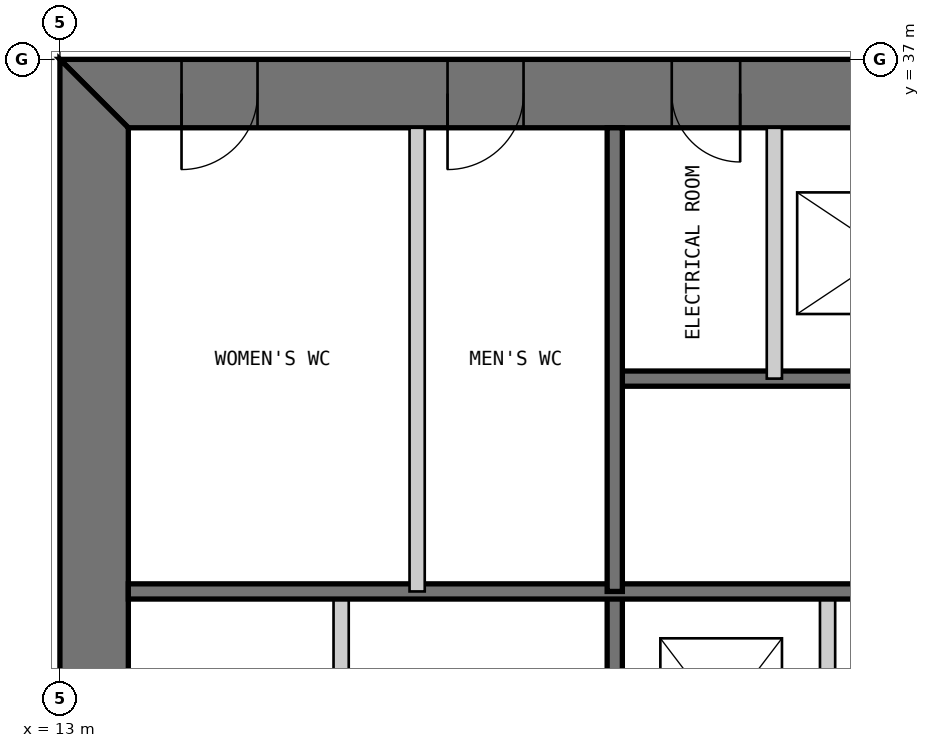
"""IFC4 building model, lengths in metres.
Left out: names, types, materials, properties, quantities, classifications, styles, units other than length and angle.
Written with IfcOpenShell. Run it as: python <this file> out.ifc"""

import sys

from ifc_helpers import new_model, si_unit, direction, frame, frame_2d, origin, place, context, subcontext, project, spatial, polyline, rectangle, outline, extrude, element, fill, save


model = new_model("IFC4")
c1 = context("Model", 3, precision=1e-05, world=origin(), true_north=direction((0.0, 1.0)))
c2 = subcontext(c1, "Body", "Model", "MODEL_VIEW")
j1 = project(units=[si_unit("LENGTHUNIT", "METRE"), si_unit("PLANEANGLEUNIT", "RADIAN")], contexts=[c1])
p1 = place(None, origin())
s1 = spatial("IfcSite", under=j1, at=p1, CompositionType="ELEMENT")
p2 = place(p1, origin())
s2 = spatial("IfcBuilding", under=s1, at=p2, CompositionType="ELEMENT")
p3 = place(p2, frame((0.0, 0.0, 106.4)))
s3 = spatial("IfcBuildingStorey", under=s2, at=p3, CompositionType="ELEMENT", Elevation=106.4)
p4 = place(p3, frame((37.0, 36.55, 0.0), z_axis=(0.0, 0.0, 1.0), x_axis=(-1.0, 0.0, 0.0)))
e1 = element("IfcWall", 1, at=p4, inside=s3, PredefinedType="SHEAR", context=c2, shape_type="SweptSolid", body=[
    extrude(outline(polyline([(0.0, -0.45), (24.0, -0.45), (23.1, 0.45), (0.9, 0.45), (0.0, -0.45)])), origin(), (0.0, 0.0, 1.0), 4.0),
])
p5 = place(p4, frame((4.9, 0.0, 0.0)))
e2 = element("IfcOpeningElement", 2, at=p5, cuts=e1, PredefinedType="OPENING", context=c2, shape_type="SweptSolid", body=[
    extrude(rectangle(XDim=1.0, YDim=2.2, at=frame_2d((0.5, 1.1))), frame((0.0, 0.46, 0.0), z_axis=(0.0, -1.0, 0.0), x_axis=(1.0, 0.0, 0.0)), (0.0, 0.0, 1.0), 0.92),
])
p6 = place(p4, frame((8.9, 0.0, 0.0)))
e3 = element("IfcOpeningElement", 3, at=p6, cuts=e1, PredefinedType="OPENING", context=c2, shape_type="SweptSolid", body=[
    extrude(rectangle(XDim=1.1, YDim=2.2, at=frame_2d((0.55, 1.1))), frame((0.0, 0.46, 0.0), z_axis=(0.0, -1.0, 0.0), x_axis=(1.0, 0.0, 0.0)), (0.0, 0.0, 1.0), 0.92),
])
p7 = place(p4, frame((15.05, 0.0, 0.0)))
e4 = element("IfcOpeningElement", 4, at=p7, cuts=e1, PredefinedType="OPENING", context=c2, shape_type="SweptSolid", body=[
    extrude(rectangle(XDim=0.9, YDim=2.2, at=frame_2d((0.45, 1.1))), frame((0.0, 0.46, 0.0), z_axis=(0.0, -1.0, 0.0), x_axis=(1.0, 0.0, 0.0)), (0.0, 0.0, 1.0), 0.92),
])
p8 = place(p4, frame((17.9, 0.0, 0.0)))
e5 = element("IfcOpeningElement", 5, at=p8, cuts=e1, PredefinedType="OPENING", context=c2, shape_type="SweptSolid", body=[
    extrude(rectangle(XDim=1.0, YDim=2.2, at=frame_2d((0.5, 1.1))), frame((0.0, 0.46, 0.0), z_axis=(0.0, -1.0, 0.0), x_axis=(1.0, 0.0, 0.0)), (0.0, 0.0, 1.0), 0.92),
])
p9 = place(p4, frame((21.4, 0.0, 0.0)))
e6 = element("IfcOpeningElement", 6, at=p9, cuts=e1, PredefinedType="OPENING", context=c2, shape_type="SweptSolid", body=[
    extrude(rectangle(XDim=1.0, YDim=2.2, at=frame_2d((0.5, 1.1))), frame((0.0, 0.46, 0.0), z_axis=(0.0, -1.0, 0.0), x_axis=(1.0, 0.0, 0.0)), (0.0, 0.0, 1.0), 0.92),
])
p10 = place(p3, frame((13.45, 36.1, 0.0), z_axis=(0.0, 0.0, 1.0), x_axis=(0.0, -1.0, 0.0)))
e7 = element("IfcWall", 7, at=p10, inside=s3, PredefinedType="SHEAR", context=c2, shape_type="SweptSolid", body=[
    extrude(outline(polyline([(-0.9, -0.45), (23.1, -0.45), (22.2, 0.45), (0.0, 0.45), (-0.9, -0.45)])), origin(), (0.0, 0.0, 1.0), 4.0),
])
p11 = place(p10, frame((20.2, 0.0, 0.0)))
e8 = element("IfcOpeningElement", 8, at=p11, cuts=e7, PredefinedType="OPENING", context=c2, shape_type="SweptSolid", body=[
    extrude(rectangle(XDim=1.0, YDim=2.2, at=frame_2d((0.5, 1.1))), frame((0.0, 0.46, 0.0), z_axis=(0.0, -1.0, 0.0), x_axis=(1.0, 0.0, 0.0)), (0.0, 0.0, 1.0), 0.92),
])
p12 = place(p10, frame((17.25, 0.0, 0.0)))
e9 = element("IfcOpeningElement", 9, at=p12, cuts=e7, PredefinedType="OPENING", context=c2, shape_type="SweptSolid", body=[
    extrude(rectangle(XDim=0.9, YDim=2.2, at=frame_2d((0.45, 1.1))), frame((0.0, 0.46, 0.0), z_axis=(0.0, -1.0, 0.0), x_axis=(1.0, 0.0, 0.0)), (0.0, 0.0, 1.0), 0.92),
])
p13 = place(p3, frame((16.7, 13.9, 0.0), z_axis=(0.0, 0.0, 1.0), x_axis=(0.0, 1.0, 0.0)))
e10 = element("IfcWall", 10, at=p13, inside=s3, PredefinedType="PARTITIONING", context=c2, shape_type="SweptSolid", body=[
    extrude(rectangle(XDim=16.1, YDim=0.2, at=frame_2d((8.05, 0.0))), origin(), (0.0, 0.0, 1.0), 3.8),
])
p14 = place(p13, frame((7.4, 0.0, 0.0)))
e11 = element("IfcOpeningElement", 11, at=p14, cuts=e10, PredefinedType="OPENING", context=c2, shape_type="SweptSolid", body=[
    extrude(rectangle(XDim=0.9, YDim=2.2, at=frame_2d((0.45, 1.1))), frame((0.0, 0.11, 0.0), z_axis=(0.0, -1.0, 0.0), x_axis=(1.0, 0.0, 0.0)), (0.0, 0.0, 1.0), 0.22),
])
p15 = place(p13, frame((12.4, 0.0, 0.0)))
e12 = element("IfcOpeningElement", 12, at=p15, cuts=e10, PredefinedType="OPENING", context=c2, shape_type="SweptSolid", body=[
    extrude(rectangle(XDim=0.9, YDim=2.2, at=frame_2d((0.45, 1.1))), frame((0.0, 0.11, 0.0), z_axis=(0.0, -1.0, 0.0), x_axis=(1.0, 0.0, 0.0)), (0.0, 0.0, 1.0), 0.22),
])
p16 = place(p3, frame((20.3, 13.9, 0.0), z_axis=(0.0, 0.0, 1.0), x_axis=(0.0, 1.0, 0.0)))
e13 = element("IfcWall", 13, at=p16, inside=s3, PredefinedType="SOLIDWALL", context=c2, shape_type="SweptSolid", body=[
    extrude(rectangle(XDim=16.1, YDim=0.2, at=frame_2d((8.05, 0.0))), origin(), (0.0, 0.0, 1.0), 3.8),
])
p17 = place(p16, frame((7.217, 0.0, 0.0)))
e14 = element("IfcOpeningElement", 14, at=p17, cuts=e13, PredefinedType="OPENING", context=c2, shape_type="SweptSolid", body=[
    extrude(rectangle(XDim=1.1, YDim=2.2, at=frame_2d((0.55, 1.1))), frame((0.0, 0.11, 0.0), z_axis=(0.0, -1.0, 0.0), x_axis=(1.0, 0.0, 0.0)), (0.0, 0.0, 1.0), 0.22),
])
p18 = place(p16, frame((10.55, 0.0, 0.0)))
e15 = element("IfcOpeningElement", 15, at=p18, cuts=e13, PredefinedType="OPENING", context=c2, shape_type="SweptSolid", body=[
    extrude(rectangle(XDim=1.1, YDim=2.2, at=frame_2d((0.55, 1.1))), frame((0.0, 0.11, 0.0), z_axis=(0.0, -1.0, 0.0), x_axis=(1.0, 0.0, 0.0)), (0.0, 0.0, 1.0), 0.22),
])
p19 = place(p16, frame((13.883, 0.0, 0.0)))
e16 = element("IfcOpeningElement", 16, at=p19, cuts=e13, PredefinedType="OPENING", context=c2, shape_type="SweptSolid", body=[
    extrude(rectangle(XDim=1.1, YDim=2.2, at=frame_2d((0.55, 1.1))), frame((0.0, 0.11, 0.0), z_axis=(0.0, -1.0, 0.0), x_axis=(1.0, 0.0, 0.0)), (0.0, 0.0, 1.0), 0.22),
])
p20 = place(p3, frame((23.1, 20.0, 0.0), z_axis=(0.0, 0.0, 1.0), x_axis=(0.0, 1.0, 0.0)))
e17 = element("IfcWall", 17, at=p20, inside=s3, PredefinedType="PARTITIONING", context=c2, shape_type="SweptSolid", body=[
    extrude(rectangle(XDim=10.0, YDim=0.2, at=frame_2d((5.0, 0.0))), origin(), (0.0, 0.0, 1.0), 3.8),
])
p21 = place(p3, frame((29.7, 32.8, 0.0), z_axis=(0.0, 0.0, 1.0), x_axis=(-1.0, 0.0, 0.0)))
e18 = element("IfcWall", 18, at=p21, inside=s3, PredefinedType="SOLIDWALL", context=c2, shape_type="SweptSolid", body=[
    extrude(rectangle(XDim=9.4, YDim=0.2, at=frame_2d((4.7, 0.0))), origin(), (0.0, 0.0, 1.0), 3.8),
])
p22 = place(p21, frame((0.25, 0.0, 0.0)))
e19 = element("IfcOpeningElement", 19, at=p22, cuts=e18, PredefinedType="OPENING", context=c2, shape_type="SweptSolid", body=[
    extrude(rectangle(XDim=1.0, YDim=2.2, at=frame_2d((0.5, 1.1))), frame((0.0, 0.11, 0.0), z_axis=(0.0, -1.0, 0.0), x_axis=(1.0, 0.0, 0.0)), (0.0, 0.0, 1.0), 0.22),
])
p23 = place(p3, frame((29.7, 30.0, 0.0), z_axis=(0.0, 0.0, 1.0), x_axis=(-1.0, 0.0, 0.0)))
e20 = element("IfcWall", 20, at=p23, inside=s3, PredefinedType="SOLIDWALL", context=c2, shape_type="SweptSolid", body=[
    extrude(rectangle(XDim=15.8, YDim=0.2, at=frame_2d((7.9, 0.0))), origin(), (0.0, 0.0, 1.0), 3.8),
])
p24 = place(p3, frame((22.4, 36.1, 0.0), z_axis=(0.0, 0.0, 1.0), x_axis=(0.0, -1.0, 0.0)))
e21 = element("IfcWall", 21, at=p24, inside=s3, PredefinedType="PARTITIONING", context=c2, shape_type="SweptSolid", body=[
    extrude(rectangle(XDim=3.3, YDim=0.2, at=frame_2d((1.65, 0.0))), origin(), (0.0, 0.0, 1.0), 3.8),
])
p25 = place(p3, frame((20.3, 36.1, 0.0), z_axis=(0.0, 0.0, 1.0), x_axis=(0.0, -1.0, 0.0)))
e22 = element("IfcWall", 22, at=p25, inside=s3, PredefinedType="SOLIDWALL", context=c2, shape_type="SweptSolid", body=[
    extrude(rectangle(XDim=6.1, YDim=0.2, at=frame_2d((3.05, 0.0))), origin(), (0.0, 0.0, 1.0), 3.8),
])
p26 = place(p3, frame((17.7, 36.1, 0.0), z_axis=(0.0, 0.0, 1.0), x_axis=(0.0, -1.0, 0.0)))
e23 = element("IfcWall", 23, at=p26, inside=s3, PredefinedType="PARTITIONING", context=c2, shape_type="SweptSolid", body=[
    extrude(rectangle(XDim=6.1, YDim=0.2, at=frame_2d((3.05, 0.0))), origin(), (0.0, 0.0, 1.0), 3.8),
])
p27 = place(p7, origin())
e24 = element("IfcDoor", 24, at=p27, inside=s3, OperationType="SINGLE_SWING_LEFT", PredefinedType="DOOR", context=c2, shape_type="SweptSolid", body=[
    extrude(rectangle(XDim=0.9, YDim=2.2, at=frame_2d((0.45, 1.1))), frame((0.0, 0.025, 0.0), z_axis=(0.0, -1.0, 0.0), x_axis=(1.0, 0.0, 0.0)), (0.0, 0.0, 1.0), 0.05),
    extrude(outline(polyline([(0.0, 0.0), (0.04, 0.0), (0.04, 2.16), (0.86, 2.16), (0.86, 0.0), (0.9, 0.0), (0.9, 2.2), (0.0, 2.2), (0.0, 0.0)])), frame((0.0, 0.3, 0.0), z_axis=(0.0, -1.0, 0.0), x_axis=(1.0, 0.0, 0.0)), (0.0, 0.0, 1.0), 0.6),
])
fill(e4, e24)
p28 = place(p8, origin())
e25 = element("IfcDoor", 25, at=p28, inside=s3, OperationType="SINGLE_SWING_RIGHT", PredefinedType="DOOR", context=c2, shape_type="SweptSolid", body=[
    extrude(rectangle(XDim=1.0, YDim=2.2, at=frame_2d((0.5, 1.1))), frame((0.0, 0.025, 0.0), z_axis=(0.0, -1.0, 0.0), x_axis=(1.0, 0.0, 0.0)), (0.0, 0.0, 1.0), 0.05),
    extrude(outline(polyline([(0.0, 0.0), (0.04, 0.0), (0.04, 2.16), (0.96, 2.16), (0.96, 0.0), (1.0, 0.0), (1.0, 2.2), (0.0, 2.2), (0.0, 0.0)])), frame((0.0, 0.3, 0.0), z_axis=(0.0, -1.0, 0.0), x_axis=(1.0, 0.0, 0.0)), (0.0, 0.0, 1.0), 0.6),
])
fill(e5, e25)
p29 = place(p9, origin())
e26 = element("IfcDoor", 26, at=p29, inside=s3, OperationType="SINGLE_SWING_RIGHT", PredefinedType="DOOR", context=c2, shape_type="SweptSolid", body=[
    extrude(rectangle(XDim=1.0, YDim=2.2, at=frame_2d((0.5, 1.1))), frame((0.0, 0.025, 0.0), z_axis=(0.0, -1.0, 0.0), x_axis=(1.0, 0.0, 0.0)), (0.0, 0.0, 1.0), 0.05),
    extrude(outline(polyline([(0.0, 0.0), (0.04, 0.0), (0.04, 2.16), (0.96, 2.16), (0.96, 0.0), (1.0, 0.0), (1.0, 2.2), (0.0, 2.2), (0.0, 0.0)])), frame((0.0, 0.3, 0.0), z_axis=(0.0, -1.0, 0.0), x_axis=(1.0, 0.0, 0.0)), (0.0, 0.0, 1.0), 0.6),
])
fill(e6, e26)
save(model, sys.argv[1])
